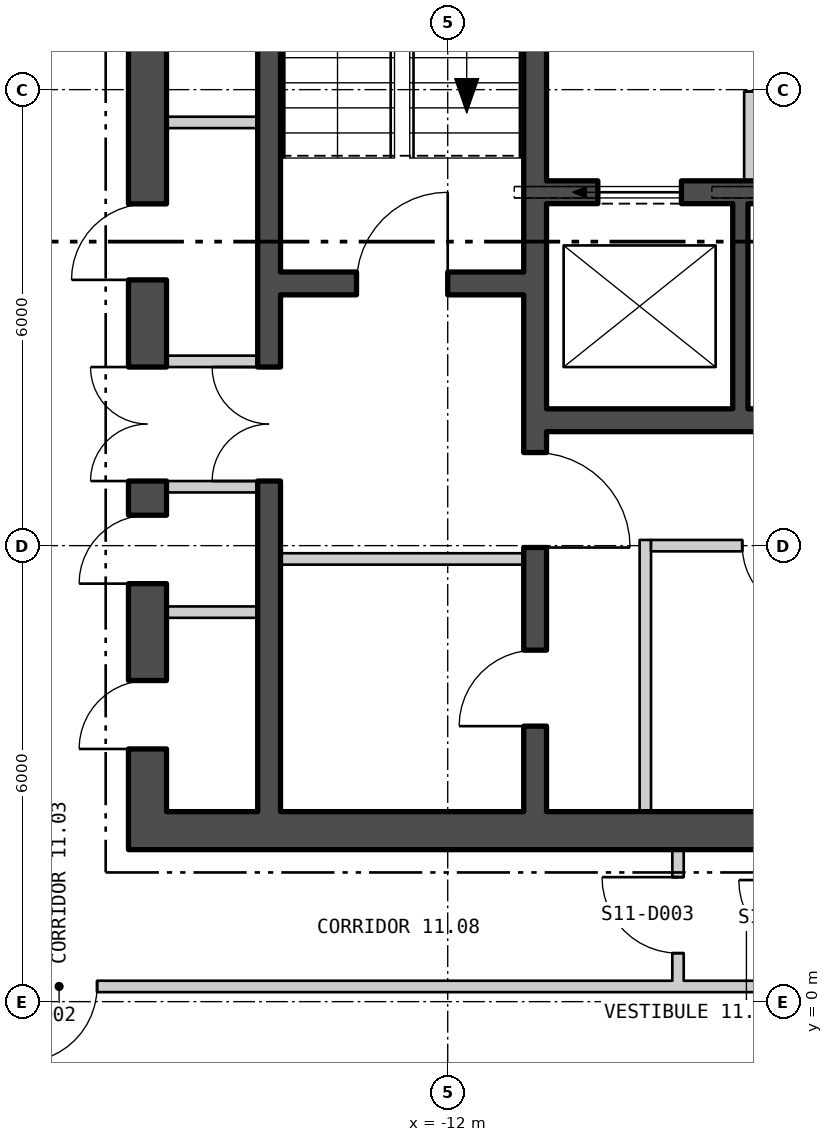
"""IFC4 building model, lengths in metres.
Left out: names, types, materials, properties, quantities, classifications, styles, units other than length and angle.
Written with IfcOpenShell. Run it as: python <this file> out.ifc"""

import sys

from ifc_helpers import new_model, si_unit, direction, frame, frame_2d, origin, place, context, subcontext, project, spatial, polyline, rectangle, outline, extrude, element, fill, save


model = new_model("IFC4")
c1 = context("Model", 3, precision=1e-05, world=origin(), true_north=direction((0.0, 1.0)))
c2 = subcontext(c1, "Body", "Model", "MODEL_VIEW")
j1 = project(units=[si_unit("LENGTHUNIT", "METRE"), si_unit("PLANEANGLEUNIT", "RADIAN")], contexts=[c1])
p1 = place(None, origin())
s1 = spatial("IfcSite", under=j1, at=p1, CompositionType="ELEMENT")
p2 = place(p1, origin())
s2 = spatial("IfcBuilding", under=s1, at=p2, CompositionType="ELEMENT")
p3 = place(p2, frame((0.0, 0.0, 151.5)))
s3 = spatial("IfcBuildingStorey", under=s2, at=p3, CompositionType="ELEMENT", Elevation=151.5)
p4 = place(p3, frame((-27.075, 12.683, -0.18), z_axis=(0.0, 0.0, 1.0), x_axis=(0.500000141277, -0.866025322218, 0.0)))
e1 = element("IfcWall", 1, at=p4, inside=s3, PredefinedType="SOLIDWALL", context=c2, shape_type="SweptSolid", body=[
    extrude(outline(polyline([(-0.13, -0.225), (45.86, -0.225), (45.6, 0.225), (0.13, 0.225), (-0.13, -0.225)])), origin(), (0.0, 0.0, 1.0), 3.68),
])
p5 = place(p4, frame((1.424, 0.0, 1.08)))
e2 = element("IfcOpeningElement", 2, at=p5, cuts=e1, PredefinedType="OPENING", context=c2, shape_type="SweptSolid", body=[
    extrude(rectangle(XDim=2.4, YDim=2.0, at=frame_2d((1.2, 1.0))), frame((0.0, 0.235, 0.0), z_axis=(0.0, -1.0, 0.0), x_axis=(1.0, 0.0, 0.0)), (0.0, 0.0, 1.0), 0.47),
])
p6 = place(p4, frame((5.892, 0.0, 1.08)))
e3 = element("IfcOpeningElement", 3, at=p6, cuts=e1, PredefinedType="OPENING", context=c2, shape_type="SweptSolid", body=[
    extrude(rectangle(XDim=2.4, YDim=2.0, at=frame_2d((1.2, 1.0))), frame((0.0, 0.235, 0.0), z_axis=(0.0, -1.0, 0.0), x_axis=(1.0, 0.0, 0.0)), (0.0, 0.0, 1.0), 0.47),
])
p7 = place(p4, frame((10.399, 0.0, 1.08)))
e4 = element("IfcOpeningElement", 4, at=p7, cuts=e1, PredefinedType="OPENING", context=c2, shape_type="SweptSolid", body=[
    extrude(rectangle(XDim=2.4, YDim=2.0, at=frame_2d((1.2, 1.0))), frame((0.0, 0.235, 0.0), z_axis=(0.0, -1.0, 0.0), x_axis=(1.0, 0.0, 0.0)), (0.0, 0.0, 1.0), 0.47),
])
p8 = place(p4, frame((14.905, 0.0, 1.08)))
e5 = element("IfcOpeningElement", 5, at=p8, cuts=e1, PredefinedType="OPENING", context=c2, shape_type="SweptSolid", body=[
    extrude(rectangle(XDim=2.4, YDim=2.0, at=frame_2d((1.2, 1.0))), frame((0.0, 0.235, 0.0), z_axis=(0.0, -1.0, 0.0), x_axis=(1.0, 0.0, 0.0)), (0.0, 0.0, 1.0), 0.47),
])
p9 = place(p4, frame((19.412, 0.0, 1.08)))
e6 = element("IfcOpeningElement", 6, at=p9, cuts=e1, PredefinedType="OPENING", context=c2, shape_type="SweptSolid", body=[
    extrude(rectangle(XDim=2.4, YDim=2.0, at=frame_2d((1.2, 1.0))), frame((0.0, 0.235, 0.0), z_axis=(0.0, -1.0, 0.0), x_axis=(1.0, 0.0, 0.0)), (0.0, 0.0, 1.0), 0.47),
])
p10 = place(p4, frame((23.918, 0.0, 1.08)))
e7 = element("IfcOpeningElement", 7, at=p10, cuts=e1, PredefinedType="OPENING", context=c2, shape_type="SweptSolid", body=[
    extrude(rectangle(XDim=2.4, YDim=2.0, at=frame_2d((1.2, 1.0))), frame((0.0, 0.235, 0.0), z_axis=(0.0, -1.0, 0.0), x_axis=(1.0, 0.0, 0.0)), (0.0, 0.0, 1.0), 0.47),
])
p11 = place(p4, frame((28.425, 0.0, 1.08)))
e8 = element("IfcOpeningElement", 8, at=p11, cuts=e1, PredefinedType="OPENING", context=c2, shape_type="SweptSolid", body=[
    extrude(rectangle(XDim=2.4, YDim=2.0, at=frame_2d((1.2, 1.0))), frame((0.0, 0.235, 0.0), z_axis=(0.0, -1.0, 0.0), x_axis=(1.0, 0.0, 0.0)), (0.0, 0.0, 1.0), 0.47),
])
p12 = place(p4, frame((32.932, 0.0, 1.08)))
e9 = element("IfcOpeningElement", 9, at=p12, cuts=e1, PredefinedType="OPENING", context=c2, shape_type="SweptSolid", body=[
    extrude(rectangle(XDim=2.4, YDim=2.0, at=frame_2d((1.2, 1.0))), frame((0.0, 0.235, 0.0), z_axis=(0.0, -1.0, 0.0), x_axis=(1.0, 0.0, 0.0)), (0.0, 0.0, 1.0), 0.47),
])
p13 = place(p4, frame((37.438, 0.0, 1.08)))
e10 = element("IfcOpeningElement", 10, at=p13, cuts=e1, PredefinedType="OPENING", context=c2, shape_type="SweptSolid", body=[
    extrude(rectangle(XDim=2.4, YDim=2.0, at=frame_2d((1.2, 1.0))), frame((0.0, 0.235, 0.0), z_axis=(0.0, -1.0, 0.0), x_axis=(1.0, 0.0, 0.0)), (0.0, 0.0, 1.0), 0.47),
])
p14 = place(p4, frame((41.907, 0.0, 1.08)))
e11 = element("IfcOpeningElement", 11, at=p14, cuts=e1, PredefinedType="OPENING", context=c2, shape_type="SweptSolid", body=[
    extrude(rectangle(XDim=2.4, YDim=2.0, at=frame_2d((1.2, 1.0))), frame((0.0, 0.235, 0.0), z_axis=(0.0, -1.0, 0.0), x_axis=(1.0, 0.0, 0.0)), (0.0, 0.0, 1.0), 0.47),
])
p15 = place(p3, frame((-16.2, 2.25, 0.0), z_axis=(0.0, 0.0, 1.0), x_axis=(1.0, 0.0, 0.0)))
e12 = element("IfcWall", 12, at=p15, inside=s3, PredefinedType="SHEAR", context=c2, shape_type="SweptSolid", body=[
    extrude(rectangle(XDim=32.4, YDim=0.5, at=frame_2d((16.2, 0.0))), origin(), (0.0, 0.0, 1.0), 3.7),
])
p16 = place(p15, frame((10.7, 0.0, 0.0)))
e13 = element("IfcOpeningElement", 13, at=p16, cuts=e12, PredefinedType="OPENING", context=c2, shape_type="SweptSolid", body=[
    extrude(rectangle(XDim=1.8, YDim=2.4, at=frame_2d((0.9, 1.2))), frame((0.0, 0.26, 0.0), z_axis=(0.0, -1.0, 0.0), x_axis=(1.0, 0.0, 0.0)), (0.0, 0.0, 1.0), 0.52),
])
p17 = place(p15, frame((20.7, 0.0, 0.0)))
e14 = element("IfcOpeningElement", 14, at=p17, cuts=e12, PredefinedType="OPENING", context=c2, shape_type="SweptSolid", body=[
    extrude(rectangle(XDim=1.8, YDim=2.4, at=frame_2d((0.9, 1.2))), frame((0.0, 0.26, 0.0), z_axis=(0.0, -1.0, 0.0), x_axis=(1.0, 0.0, 0.0)), (0.0, 0.0, 1.0), 0.52),
])
p18 = place(p3, frame((-15.95, 2.5, 0.0), z_axis=(0.0, 0.0, 1.0), x_axis=(0.0, 1.0, 0.0)))
e15 = element("IfcWall", 15, at=p18, inside=s3, PredefinedType="SHEAR", context=c2, shape_type="SweptSolid", body=[
    extrude(rectangle(XDim=15.0, YDim=0.5, at=frame_2d((7.5, 0.0))), origin(), (0.0, 0.0, 1.0), 3.7),
])
p19 = place(p18, frame((4.35, 0.0, 0.0)))
e16 = element("IfcOpeningElement", 16, at=p19, cuts=e15, PredefinedType="OPENING", context=c2, shape_type="SweptSolid", body=[
    extrude(rectangle(XDim=1.5, YDim=2.1, at=frame_2d((0.75, 1.05))), frame((0.0, 0.26, 0.0), z_axis=(0.0, -1.0, 0.0), x_axis=(1.0, 0.0, 0.0)), (0.0, 0.0, 1.0), 0.52),
])
p20 = place(p18, frame((0.825, 0.0, 0.0)))
e17 = element("IfcOpeningElement", 17, at=p20, cuts=e15, PredefinedType="OPENING", context=c2, shape_type="SweptSolid", body=[
    extrude(rectangle(XDim=0.9, YDim=2.1, at=frame_2d((0.45, 1.05))), frame((0.0, 0.26, 0.0), z_axis=(0.0, -1.0, 0.0), x_axis=(1.0, 0.0, 0.0)), (0.0, 0.0, 1.0), 0.52),
])
p21 = place(p18, frame((3.0, 0.0, 0.0)))
e18 = element("IfcOpeningElement", 18, at=p21, cuts=e15, PredefinedType="OPENING", context=c2, shape_type="SweptSolid", body=[
    extrude(rectangle(XDim=0.9, YDim=2.1, at=frame_2d((0.45, 1.05))), frame((0.0, 0.26, 0.0), z_axis=(0.0, -1.0, 0.0), x_axis=(1.0, 0.0, 0.0)), (0.0, 0.0, 1.0), 0.52),
])
p22 = place(p18, frame((6.997, 0.0, 0.0)))
e19 = element("IfcOpeningElement", 19, at=p22, cuts=e15, PredefinedType="OPENING", context=c2, shape_type="SweptSolid", body=[
    extrude(rectangle(XDim=1.0, YDim=2.1, at=frame_2d((0.5, 1.05))), frame((0.0, 0.26, 0.0), z_axis=(0.0, -1.0, 0.0), x_axis=(1.0, 0.0, 0.0)), (0.0, 0.0, 1.0), 0.52),
])
p23 = place(p18, frame((11.622, 0.0, 0.0)))
e20 = element("IfcOpeningElement", 20, at=p23, cuts=e15, PredefinedType="OPENING", context=c2, shape_type="SweptSolid", body=[
    extrude(rectangle(XDim=0.9, YDim=2.1, at=frame_2d((0.45, 1.05))), frame((0.0, 0.26, 0.0), z_axis=(0.0, -1.0, 0.0), x_axis=(1.0, 0.0, 0.0)), (0.0, 0.0, 1.0), 0.52),
])
p24 = place(p3, frame((-10.85, 2.5, 0.0), z_axis=(0.0, 0.0, 1.0), x_axis=(0.0, 1.0, 0.0)))
e21 = element("IfcWall", 21, at=p24, inside=s3, PredefinedType="SHEAR", context=c2, shape_type="SweptSolid", body=[
    extrude(rectangle(XDim=15.0, YDim=0.3, at=frame_2d((7.5, 0.0))), origin(), (0.0, 0.0, 1.0), 3.7),
])
p25 = place(p24, frame((3.475, 0.0, 0.0)))
e22 = element("IfcOpeningElement", 22, at=p25, cuts=e21, PredefinedType="OPENING", context=c2, shape_type="SweptSolid", body=[
    extrude(rectangle(XDim=1.25, YDim=2.1, at=frame_2d((0.625, 1.05))), frame((0.0, 0.16, 0.0), z_axis=(0.0, -1.0, 0.0), x_axis=(1.0, 0.0, 0.0)), (0.0, 0.0, 1.0), 0.32),
])
p26 = place(p24, frame((1.125, 0.0, 0.0)))
e23 = element("IfcOpeningElement", 23, at=p26, cuts=e21, PredefinedType="OPENING", context=c2, shape_type="SweptSolid", body=[
    extrude(rectangle(XDim=1.0, YDim=2.1, at=frame_2d((0.5, 1.05))), frame((0.0, 0.16, 0.0), z_axis=(0.0, -1.0, 0.0), x_axis=(1.0, 0.0, 0.0)), (0.0, 0.0, 1.0), 0.32),
])
p27 = place(p3, frame((-14.35, 2.5, 0.0), z_axis=(0.0, 0.0, 1.0), x_axis=(0.0, 1.0, 0.0)))
e24 = element("IfcWall", 24, at=p27, inside=s3, PredefinedType="SHEAR", context=c2, shape_type="SweptSolid", body=[
    extrude(rectangle(XDim=15.0, YDim=0.3, at=frame_2d((7.5, 0.0))), origin(), (0.0, 0.0, 1.0), 3.7),
])
p28 = place(p27, frame((4.35, 0.0, 0.0)))
e25 = element("IfcOpeningElement", 25, at=p28, cuts=e24, PredefinedType="OPENING", context=c2, shape_type="SweptSolid", body=[
    extrude(rectangle(XDim=1.5, YDim=2.1, at=frame_2d((0.75, 1.05))), frame((0.0, 0.16, 0.0), z_axis=(0.0, -1.0, 0.0), x_axis=(1.0, 0.0, 0.0)), (0.0, 0.0, 1.0), 0.32),
])
p29 = place(p3, frame((-14.2, 9.45, 0.0), z_axis=(0.0, 0.0, 1.0), x_axis=(1.0, 0.0, 0.0)))
e26 = element("IfcWall", 26, at=p29, inside=s3, PredefinedType="SHEAR", context=c2, shape_type="SweptSolid", body=[
    extrude(rectangle(XDim=3.2, YDim=0.3, at=frame_2d((1.6, 0.0))), origin(), (0.0, 0.0, 1.0), 3.7),
])
p30 = place(p29, frame((1.0, 0.0, 0.0)))
e27 = element("IfcOpeningElement", 27, at=p30, cuts=e26, PredefinedType="OPENING", context=c2, shape_type="SweptSolid", body=[
    extrude(rectangle(XDim=1.2, YDim=2.1, at=frame_2d((0.6, 1.05))), frame((0.0, 0.16, 0.0), z_axis=(0.0, -1.0, 0.0), x_axis=(1.0, 0.0, 0.0)), (0.0, 0.0, 1.0), 0.32),
])
p31 = place(p3, frame((-10.7, 10.65, 0.0), z_axis=(0.0, 0.0, 1.0), x_axis=(1.0, 0.0, 0.0)))
e28 = element("IfcWall", 28, at=p31, inside=s3, PredefinedType="SHEAR", context=c2, shape_type="SweptSolid", body=[
    extrude(rectangle(XDim=10.3, YDim=0.3, at=frame_2d((5.15, 0.0))), origin(), (0.0, 0.0, 1.0), 3.7),
])
p32 = place(p31, frame((0.675, 0.0, 0.0)))
e29 = element("IfcOpeningElement", 29, at=p32, cuts=e28, PredefinedType="OPENING", context=c2, shape_type="SweptSolid", body=[
    extrude(rectangle(XDim=1.1, YDim=2.1, at=frame_2d((0.55, 1.05))), frame((0.0, 0.16, 0.0), z_axis=(0.0, -1.0, 0.0), x_axis=(1.0, 0.0, 0.0)), (0.0, 0.0, 1.0), 0.32),
])
p33 = place(p31, frame((3.275, 0.0, 0.0)))
e30 = element("IfcOpeningElement", 30, at=p33, cuts=e28, PredefinedType="OPENING", context=c2, shape_type="SweptSolid", body=[
    extrude(rectangle(XDim=1.1, YDim=2.1, at=frame_2d((0.55, 1.05))), frame((0.0, 0.16, 0.0), z_axis=(0.0, -1.0, 0.0), x_axis=(1.0, 0.0, 0.0)), (0.0, 0.0, 1.0), 0.32),
])
p34 = place(p31, frame((5.825, 0.0, 0.0)))
e31 = element("IfcOpeningElement", 31, at=p34, cuts=e28, PredefinedType="OPENING", context=c2, shape_type="SweptSolid", body=[
    extrude(rectangle(XDim=1.1, YDim=2.1, at=frame_2d((0.55, 1.05))), frame((0.0, 0.16, 0.0), z_axis=(0.0, -1.0, 0.0), x_axis=(1.0, 0.0, 0.0)), (0.0, 0.0, 1.0), 0.32),
])
p35 = place(p31, frame((8.425, 0.0, 0.0)))
e32 = element("IfcOpeningElement", 32, at=p35, cuts=e28, PredefinedType="OPENING", context=c2, shape_type="SweptSolid", body=[
    extrude(rectangle(XDim=1.0, YDim=2.1, at=frame_2d((0.5, 1.05))), frame((0.0, 0.16, 0.0), z_axis=(0.0, -1.0, 0.0), x_axis=(1.0, 0.0, 0.0)), (0.0, 0.0, 1.0), 0.32),
])
p36 = place(p3, frame((-10.7, 7.65, 0.0), z_axis=(0.0, 0.0, 1.0), x_axis=(1.0, 0.0, 0.0)))
e33 = element("IfcWall", 33, at=p36, inside=s3, PredefinedType="SHEAR", context=c2, shape_type="SweptSolid", body=[
    extrude(rectangle(XDim=10.3, YDim=0.3, at=frame_2d((5.15, 0.0))), origin(), (0.0, 0.0, 1.0), 3.7),
])
p37 = place(p3, frame((-8.15, 7.8, 0.0), z_axis=(0.0, 0.0, 1.0), x_axis=(0.0, 1.0, 0.0)))
e34 = element("IfcWall", 34, at=p37, inside=s3, PredefinedType="SHEAR", context=c2, shape_type="SweptSolid", body=[
    extrude(rectangle(XDim=2.7, YDim=0.2, at=frame_2d((1.35, 0.0))), origin(), (0.0, 0.0, 1.0), 3.7),
])
p38 = place(p3, frame((-8.025, 10.8, 0.0), z_axis=(0.0, 0.0, 1.0), x_axis=(0.0, 1.0, 0.0)))
e35 = element("IfcWall", 35, at=p38, inside=s3, PredefinedType="PARTITIONING", context=c2, shape_type="SweptSolid", body=[
    extrude(rectangle(XDim=3.6, YDim=0.15, at=frame_2d((1.8, 0.0))), origin(), (0.0, 0.0, 1.0), 3.7),
])
p39 = place(p38, frame((1.175, 0.0, 0.0)))
e36 = element("IfcOpeningElement", 36, at=p39, cuts=e35, PredefinedType="OPENING", context=c2, shape_type="SweptSolid", body=[
    extrude(rectangle(XDim=1.25, YDim=2.1, at=frame_2d((0.625, 1.05))), frame((0.0, 0.085, 0.0), z_axis=(0.0, -1.0, 0.0), x_axis=(1.0, 0.0, 0.0)), (0.0, 0.0, 1.0), 0.17),
])
p40 = place(p3, frame((-14.2, 5.825, 0.0), z_axis=(0.0, 0.0, 1.0), x_axis=(1.0, 0.0, 0.0)))
e37 = element("IfcWall", 37, at=p40, inside=s3, PredefinedType="PARTITIONING", context=c2, shape_type="SweptSolid", body=[
    extrude(rectangle(XDim=3.2, YDim=0.15, at=frame_2d((1.6, 0.0))), origin(), (0.0, 0.0, 1.0), 3.7),
])
for number, where, z_axis, x_axis in (
    (38, (-15.7, 6.775, 0.0), (0.0, 0.0, 1.0), (1.0, 0.0, 0.0)),
    (39, (-15.7, 8.425, 0.0), (0.0, 0.0, 1.0), (1.0, 0.0, 0.0)),
    (40, (-15.7, 5.125, 0.0), (0.0, 0.0, 1.0), (1.0, 0.0, 0.0)),
    (41, (-15.7, 11.569, 0.0), (0.0, 0.0, 1.0), (1.0, 0.0, 0.0)),
):
    element("IfcWall", number, at=place(p3, frame(where, z_axis=z_axis, x_axis=x_axis)), inside=s3, PredefinedType="PARTITIONING", context=c2, shape_type="SweptSolid", body=[
        extrude(rectangle(XDim=1.2, YDim=0.15, at=frame_2d((0.6, 0.0))), origin(), (0.0, 0.0, 1.0), 3.7),
    ])
p41 = place(p3, frame((-9.4, 2.5, 0.0), z_axis=(0.0, 0.0, 1.0), x_axis=(0.0, 1.0, 0.0)))
e42 = element("IfcWall", 42, at=p41, inside=s3, PredefinedType="PARTITIONING", context=c2, shape_type="SweptSolid", body=[
    extrude(rectangle(XDim=3.575, YDim=0.15, at=frame_2d((1.788, 0.0))), origin(), (0.0, 0.0, 1.0), 3.7),
])
p42 = place(p3, frame((-9.325, 6.0, 0.0), z_axis=(0.0, 0.0, 1.0), x_axis=(1.0, 0.0, 0.0)))
e43 = element("IfcWall", 43, at=p42, inside=s3, PredefinedType="PARTITIONING", context=c2, shape_type="SweptSolid", body=[
    extrude(rectangle(XDim=3.3, YDim=0.15, at=frame_2d((1.65, 0.0))), origin(), (0.0, 0.0, 1.0), 3.7),
])
p43 = place(p42, frame((1.2, 0.0, 0.0)))
e44 = element("IfcOpeningElement", 44, at=p43, cuts=e43, PredefinedType="OPENING", context=c2, shape_type="SweptSolid", body=[
    extrude(rectangle(XDim=0.9, YDim=2.1, at=frame_2d((0.45, 1.05))), frame((0.0, 0.085, 0.0), z_axis=(0.0, -1.0, 0.0), x_axis=(1.0, 0.0, 0.0)), (0.0, 0.0, 1.0), 0.17),
])
p44 = place(p3, frame((-17.925, 0.2, 0.0), z_axis=(0.0, 0.0, 1.0), x_axis=(1.0, 0.0, 0.0)))
e45 = element("IfcWall", 45, at=p44, inside=s3, PredefinedType="PARTITIONING", context=c2, shape_type="SweptSolid", body=[
    extrude(rectangle(XDim=10.68, YDim=0.15, at=frame_2d((5.34, 0.0))), origin(), (0.0, 0.0, 1.0), 3.7),
])
p45 = place(p44, frame((0.312, 0.0, 0.0)))
e46 = element("IfcOpeningElement", 46, at=p45, cuts=e45, PredefinedType="OPENING", context=c2, shape_type="SweptSolid", body=[
    extrude(rectangle(XDim=1.0, YDim=2.1, at=frame_2d((0.5, 1.05))), frame((0.0, 0.085, 0.0), z_axis=(0.0, -1.0, 0.0), x_axis=(1.0, 0.0, 0.0)), (0.0, 0.0, 1.0), 0.17),
])
p46 = place(p3, frame((-8.97, 0.275, 0.0), z_axis=(0.0, 0.0, 1.0), x_axis=(0.0, 1.0, 0.0)))
e47 = element("IfcWall", 47, at=p46, inside=s3, PredefinedType="PARTITIONING", context=c2, shape_type="SweptSolid", body=[
    extrude(rectangle(XDim=1.725, YDim=0.15, at=frame_2d((0.863, 0.0))), origin(), (0.0, 0.0, 1.0), 3.7),
])
p47 = place(p46, frame((0.363, 0.0, 0.0)))
e48 = element("IfcOpeningElement", 48, at=p47, cuts=e47, PredefinedType="OPENING", context=c2, shape_type="SweptSolid", body=[
    extrude(rectangle(XDim=1.0, YDim=2.1, at=frame_2d((0.5, 1.05))), frame((0.0, 0.085, 0.0), z_axis=(0.0, -1.0, 0.0), x_axis=(1.0, 0.0, 0.0)), (0.0, 0.0, 1.0), 0.17),
])
p48 = place(p32, origin())
e49 = element("IfcDoor", 49, at=p48, inside=s3, OperationType="SLIDING_TO_LEFT", PredefinedType="DOOR", context=c2, shape_type="SweptSolid", body=[
    extrude(rectangle(XDim=1.1, YDim=2.1, at=frame_2d((0.55, 1.05))), frame((0.0, 0.025, 0.0), z_axis=(0.0, -1.0, 0.0), x_axis=(1.0, 0.0, 0.0)), (0.0, 0.0, 1.0), 0.05),
])
fill(e29, e49)
p49 = place(p39, origin())
e50 = element("IfcDoor", 50, at=p49, inside=s3, OperationType="SINGLE_SWING_RIGHT", PredefinedType="DOOR", context=c2, shape_type="SweptSolid", body=[
    extrude(rectangle(XDim=1.25, YDim=2.1, at=frame_2d((0.625, 1.05))), frame((0.0, 0.025, 0.0), z_axis=(0.0, -1.0, 0.0), x_axis=(1.0, 0.0, 0.0)), (0.0, 0.0, 1.0), 0.05),
])
fill(e36, e50)
p50 = place(p30, origin())
e51 = element("IfcDoor", 51, at=p50, inside=s3, OperationType="SINGLE_SWING_LEFT", PredefinedType="DOOR", context=c2, shape_type="SweptSolid", body=[
    extrude(rectangle(XDim=1.2, YDim=2.1, at=frame_2d((0.6, 1.05))), frame((0.0, 0.025, 0.0), z_axis=(0.0, -1.0, 0.0), x_axis=(1.0, 0.0, 0.0)), (0.0, 0.0, 1.0), 0.05),
])
fill(e27, e51)
p51 = place(p25, origin())
e52 = element("IfcDoor", 52, at=p51, inside=s3, OperationType="SINGLE_SWING_LEFT", PredefinedType="DOOR", context=c2, shape_type="SweptSolid", body=[
    extrude(rectangle(XDim=1.25, YDim=2.1, at=frame_2d((0.625, 1.05))), frame((0.0, 0.025, 0.0), z_axis=(0.0, -1.0, 0.0), x_axis=(1.0, 0.0, 0.0)), (0.0, 0.0, 1.0), 0.05),
])
fill(e22, e52)
p52 = place(p26, origin())
e53 = element("IfcDoor", 53, at=p52, inside=s3, OperationType="SINGLE_SWING_RIGHT", PredefinedType="DOOR", context=c2, shape_type="SweptSolid", body=[
    extrude(rectangle(XDim=1.0, YDim=2.1, at=frame_2d((0.5, 1.05))), frame((0.0, 0.025, 0.0), z_axis=(0.0, -1.0, 0.0), x_axis=(1.0, 0.0, 0.0)), (0.0, 0.0, 1.0), 0.05),
])
fill(e23, e53)
p53 = place(p28, origin())
e54 = element("IfcDoor", 54, at=p53, inside=s3, OperationType="DOUBLE_DOOR_SINGLE_SWING", PredefinedType="DOOR", context=c2, shape_type="SweptSolid", body=[
    extrude(rectangle(XDim=1.5, YDim=2.1, at=frame_2d((0.75, 1.05))), frame((0.0, 0.025, 0.0), z_axis=(0.0, -1.0, 0.0), x_axis=(1.0, 0.0, 0.0)), (0.0, 0.0, 1.0), 0.05),
])
fill(e25, e54)
p54 = place(p19, origin())
e55 = element("IfcDoor", 55, at=p54, inside=s3, OperationType="DOUBLE_DOOR_SINGLE_SWING", PredefinedType="DOOR", context=c2, shape_type="SweptSolid", body=[
    extrude(rectangle(XDim=1.5, YDim=2.1, at=frame_2d((0.75, 1.05))), frame((0.0, 0.025, 0.0), z_axis=(0.0, -1.0, 0.0), x_axis=(1.0, 0.0, 0.0)), (0.0, 0.0, 1.0), 0.05),
])
fill(e16, e55)
p55 = place(p20, origin())
e56 = element("IfcDoor", 56, at=p55, inside=s3, OperationType="SINGLE_SWING_RIGHT", PredefinedType="DOOR", context=c2, shape_type="SweptSolid", body=[
    extrude(rectangle(XDim=0.9, YDim=2.1, at=frame_2d((0.45, 1.05))), frame((0.0, 0.025, 0.0), z_axis=(0.0, -1.0, 0.0), x_axis=(1.0, 0.0, 0.0)), (0.0, 0.0, 1.0), 0.05),
])
fill(e17, e56)
p56 = place(p21, origin())
e57 = element("IfcDoor", 57, at=p56, inside=s3, OperationType="SINGLE_SWING_RIGHT", PredefinedType="DOOR", context=c2, shape_type="SweptSolid", body=[
    extrude(rectangle(XDim=0.9, YDim=2.1, at=frame_2d((0.45, 1.05))), frame((0.0, 0.025, 0.0), z_axis=(0.0, -1.0, 0.0), x_axis=(1.0, 0.0, 0.0)), (0.0, 0.0, 1.0), 0.05),
])
fill(e18, e57)
p57 = place(p22, origin())
e58 = element("IfcDoor", 58, at=p57, inside=s3, OperationType="SINGLE_SWING_RIGHT", PredefinedType="DOOR", context=c2, shape_type="SweptSolid", body=[
    extrude(rectangle(XDim=1.0, YDim=2.1, at=frame_2d((0.5, 1.05))), frame((0.0, 0.025, 0.0), z_axis=(0.0, -1.0, 0.0), x_axis=(1.0, 0.0, 0.0)), (0.0, 0.0, 1.0), 0.05),
])
fill(e19, e58)
p58 = place(p43, origin())
e59 = element("IfcDoor", 59, at=p58, inside=s3, OperationType="SINGLE_SWING_RIGHT", PredefinedType="DOOR", context=c2, shape_type="SweptSolid", body=[
    extrude(rectangle(XDim=0.9, YDim=2.1, at=frame_2d((0.45, 1.05))), frame((0.0, 0.025, 0.0), z_axis=(0.0, -1.0, 0.0), x_axis=(1.0, 0.0, 0.0)), (0.0, 0.0, 1.0), 0.05),
])
fill(e44, e59)
p59 = place(p45, origin())
e60 = element("IfcDoor", 60, at=p59, inside=s3, OperationType="SINGLE_SWING_LEFT", PredefinedType="DOOR", context=c2, shape_type="SweptSolid", body=[
    extrude(rectangle(XDim=1.0, YDim=2.1, at=frame_2d((0.5, 1.05))), frame((0.0, 0.025, 0.0), z_axis=(0.0, -1.0, 0.0), x_axis=(1.0, 0.0, 0.0)), (0.0, 0.0, 1.0), 0.05),
])
fill(e46, e60)
p60 = place(p47, origin())
e61 = element("IfcDoor", 61, at=p60, inside=s3, OperationType="SINGLE_SWING_LEFT", PredefinedType="DOOR", context=c2, shape_type="SweptSolid", body=[
    extrude(rectangle(XDim=1.0, YDim=2.1, at=frame_2d((0.5, 1.05))), frame((0.0, 0.025, 0.0), z_axis=(0.0, -1.0, 0.0), x_axis=(1.0, 0.0, 0.0)), (0.0, 0.0, 1.0), 0.05),
])
fill(e48, e61)
save(model, sys.argv[1])
